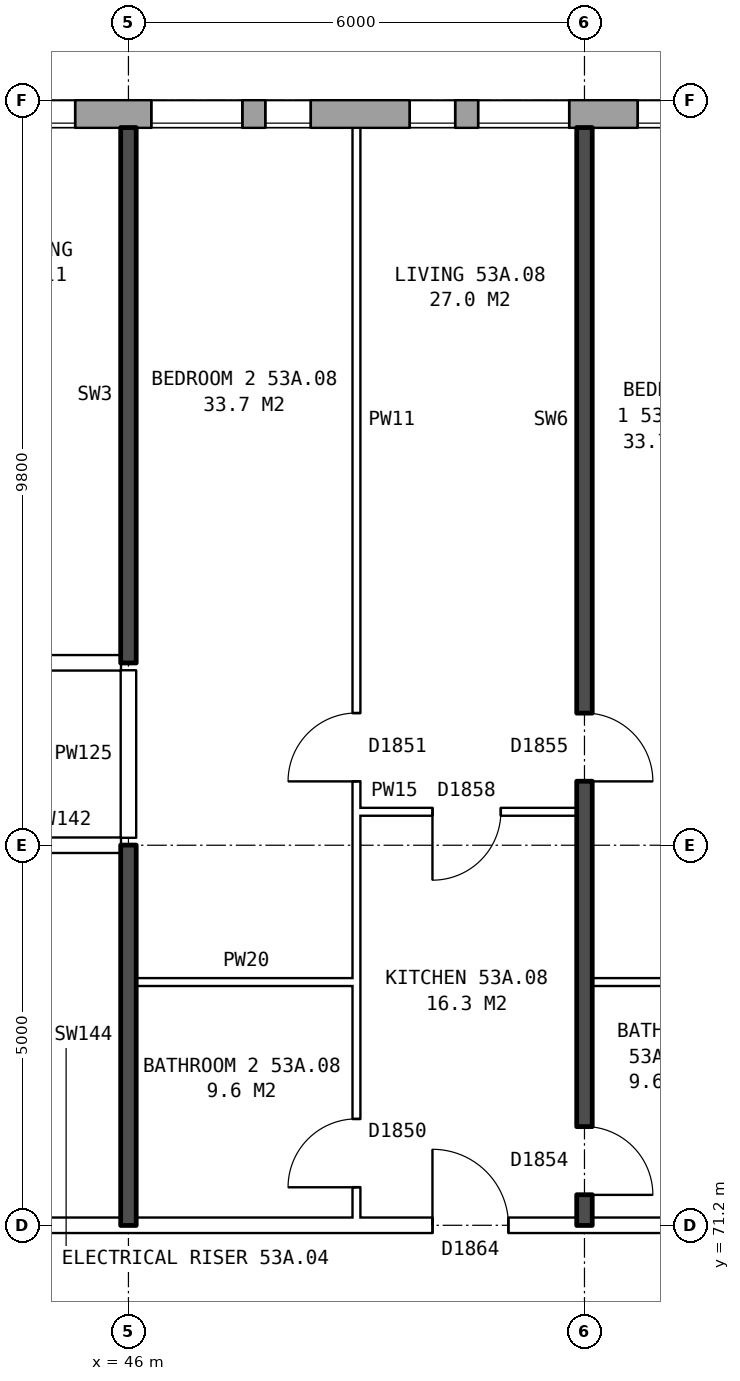
"""IFC4 building model, lengths in metres.
Left out: names, types, materials, properties, quantities, classifications, styles, units other than length and angle.
Written with IfcOpenShell. Run it as: python <this file> out.ifc"""

import sys

from ifc_helpers import new_model, si_unit, direction, frame, frame_2d, origin, place, context, subcontext, project, spatial, rectangle, extrude, element, fill, save


model = new_model("IFC4")
c1 = context("Model", 3, precision=1e-05, world=origin(), true_north=direction((0.0, 1.0)))
c2 = subcontext(c1, "Body", "Model", "MODEL_VIEW")
j1 = project(units=[si_unit("LENGTHUNIT", "METRE"), si_unit("PLANEANGLEUNIT", "RADIAN")], contexts=[c1])
p1 = place(None, origin())
s1 = spatial("IfcSite", under=j1, at=p1, CompositionType="ELEMENT")
p2 = place(p1, origin())
s2 = spatial("IfcBuilding", under=s1, at=p2, CompositionType="ELEMENT")
p3 = place(p2, frame((0.0, 0.0, 188.2)))
s3 = spatial("IfcBuildingStorey", under=s2, at=p3, CompositionType="ELEMENT", Elevation=188.2)
p4 = place(p3, frame((72.925, 85.82, 0.0), z_axis=(0.0, 0.0, 1.0), x_axis=(-1.0, 0.0, 0.0)))
e1 = element("IfcWall", 1, at=p4, inside=s3, PredefinedType="STANDARD", context=c2, shape_type="SweptSolid", body=[
    extrude(rectangle(XDim=39.601, YDim=0.36, at=frame_2d((19.8, 0.0))), origin(), (0.0, 0.0, 1.0), 2.85),
])
p5 = place(p4, frame((0.625, 0.0, 0.8)))
e2 = element("IfcOpeningElement", 2, at=p5, cuts=e1, PredefinedType="OPENING", context=c2, shape_type="SweptSolid", body=[
    extrude(rectangle(XDim=1.6, YDim=1.8, at=frame_2d((0.8, 0.9))), frame((0.0, 0.19, 0.0), z_axis=(0.0, -1.0, 0.0), x_axis=(1.0, 0.0, 0.0)), (0.0, 0.0, 1.0), 0.38),
])
p6 = place(p4, frame((3.625, 0.0, 0.8)))
e3 = element("IfcOpeningElement", 3, at=p6, cuts=e1, PredefinedType="OPENING", context=c2, shape_type="SweptSolid", body=[
    extrude(rectangle(XDim=1.6, YDim=1.8, at=frame_2d((0.8, 0.9))), frame((0.0, 0.19, 0.0), z_axis=(0.0, -1.0, 0.0), x_axis=(1.0, 0.0, 0.0)), (0.0, 0.0, 1.0), 0.38),
])
p7 = place(p4, frame((6.625, 0.0, 0.8)))
e4 = element("IfcOpeningElement", 4, at=p7, cuts=e1, PredefinedType="OPENING", context=c2, shape_type="SweptSolid", body=[
    extrude(rectangle(XDim=1.6, YDim=1.8, at=frame_2d((0.8, 0.9))), frame((0.0, 0.19, 0.0), z_axis=(0.0, -1.0, 0.0), x_axis=(1.0, 0.0, 0.0)), (0.0, 0.0, 1.0), 0.38),
])
p8 = place(p4, frame((9.625, 0.0, 0.8)))
e5 = element("IfcOpeningElement", 5, at=p8, cuts=e1, PredefinedType="OPENING", context=c2, shape_type="SweptSolid", body=[
    extrude(rectangle(XDim=1.6, YDim=1.8, at=frame_2d((0.8, 0.9))), frame((0.0, 0.19, 0.0), z_axis=(0.0, -1.0, 0.0), x_axis=(1.0, 0.0, 0.0)), (0.0, 0.0, 1.0), 0.38),
])
p9 = place(p4, frame((12.625, 0.0, 0.8)))
e6 = element("IfcOpeningElement", 6, at=p9, cuts=e1, PredefinedType="OPENING", context=c2, shape_type="SweptSolid", body=[
    extrude(rectangle(XDim=1.6, YDim=1.8, at=frame_2d((0.8, 0.9))), frame((0.0, 0.19, 0.0), z_axis=(0.0, -1.0, 0.0), x_axis=(1.0, 0.0, 0.0)), (0.0, 0.0, 1.0), 0.38),
])
p10 = place(p4, frame((15.575, 0.0, 0.15)))
e7 = element("IfcOpeningElement", 7, at=p10, cuts=e1, PredefinedType="OPENING", context=c2, shape_type="SweptSolid", body=[
    extrude(rectangle(XDim=0.6, YDim=0.9, at=frame_2d((0.3, 0.45))), frame((0.0, 0.19, 0.0), z_axis=(0.0, -1.0, 0.0), x_axis=(1.0, 0.0, 0.0)), (0.0, 0.0, 1.0), 0.38),
])
p11 = place(p4, frame((18.625, 0.0, 0.8)))
e8 = element("IfcOpeningElement", 8, at=p11, cuts=e1, PredefinedType="OPENING", context=c2, shape_type="SweptSolid", body=[
    extrude(rectangle(XDim=1.6, YDim=1.8, at=frame_2d((0.8, 0.9))), frame((0.0, 0.19, 0.0), z_axis=(0.0, -1.0, 0.0), x_axis=(1.0, 0.0, 0.0)), (0.0, 0.0, 1.0), 0.38),
])
p12 = place(p4, frame((21.125, 0.0, 0.8)))
e9 = element("IfcOpeningElement", 9, at=p12, cuts=e1, PredefinedType="OPENING", context=c2, shape_type="SweptSolid", body=[
    extrude(rectangle(XDim=1.2, YDim=1.8, at=frame_2d((0.6, 0.9))), frame((0.0, 0.19, 0.0), z_axis=(0.0, -1.0, 0.0), x_axis=(1.0, 0.0, 0.0)), (0.0, 0.0, 1.0), 0.38),
])
p13 = place(p4, frame((24.525, 0.0, 1.7)))
e10 = element("IfcOpeningElement", 10, at=p13, cuts=e1, PredefinedType="OPENING", context=c2, shape_type="SweptSolid", body=[
    extrude(rectangle(XDim=0.6, YDim=0.9, at=frame_2d((0.3, 0.45))), frame((0.0, 0.19, 0.0), z_axis=(0.0, -1.0, 0.0), x_axis=(1.0, 0.0, 0.0)), (0.0, 0.0, 1.0), 0.38),
])
p14 = place(p4, frame((27.625, 0.0, 0.8)))
e11 = element("IfcOpeningElement", 11, at=p14, cuts=e1, PredefinedType="OPENING", context=c2, shape_type="SweptSolid", body=[
    extrude(rectangle(XDim=1.6, YDim=1.8, at=frame_2d((0.8, 0.9))), frame((0.0, 0.19, 0.0), z_axis=(0.0, -1.0, 0.0), x_axis=(1.0, 0.0, 0.0)), (0.0, 0.0, 1.0), 0.38),
])
p15 = place(p4, frame((30.625, 0.0, 0.8)))
e12 = element("IfcOpeningElement", 12, at=p15, cuts=e1, PredefinedType="OPENING", context=c2, shape_type="SweptSolid", body=[
    extrude(rectangle(XDim=1.6, YDim=1.8, at=frame_2d((0.8, 0.9))), frame((0.0, 0.19, 0.0), z_axis=(0.0, -1.0, 0.0), x_axis=(1.0, 0.0, 0.0)), (0.0, 0.0, 1.0), 0.38),
])
p16 = place(p4, frame((33.625, 0.0, 0.8)))
e13 = element("IfcOpeningElement", 13, at=p16, cuts=e1, PredefinedType="OPENING", context=c2, shape_type="SweptSolid", body=[
    extrude(rectangle(XDim=1.6, YDim=1.8, at=frame_2d((0.8, 0.9))), frame((0.0, 0.19, 0.0), z_axis=(0.0, -1.0, 0.0), x_axis=(1.0, 0.0, 0.0)), (0.0, 0.0, 1.0), 0.38),
])
p17 = place(p4, frame((36.625, 0.0, 0.8)))
e14 = element("IfcOpeningElement", 14, at=p17, cuts=e1, PredefinedType="OPENING", context=c2, shape_type="SweptSolid", body=[
    extrude(rectangle(XDim=1.6, YDim=1.8, at=frame_2d((0.8, 0.9))), frame((0.0, 0.19, 0.0), z_axis=(0.0, -1.0, 0.0), x_axis=(1.0, 0.0, 0.0)), (0.0, 0.0, 1.0), 0.38),
])
p18 = place(p4, frame((16.475, 0.0, 0.15)))
e15 = element("IfcOpeningElement", 15, at=p18, cuts=e1, PredefinedType="OPENING", context=c2, shape_type="SweptSolid", body=[
    extrude(rectangle(XDim=1.2, YDim=1.8, at=frame_2d((0.6, 0.9))), frame((0.0, 0.19, 0.0), z_axis=(0.0, -1.0, 0.0), x_axis=(1.0, 0.0, 0.0)), (0.0, 0.0, 1.0), 0.38),
])
p19 = place(p4, frame((22.625, 0.0, 0.8)))
e16 = element("IfcOpeningElement", 16, at=p19, cuts=e1, PredefinedType="OPENING", context=c2, shape_type="SweptSolid", body=[
    extrude(rectangle(XDim=0.6, YDim=0.9, at=frame_2d((0.3, 0.45))), frame((0.0, 0.19, 0.0), z_axis=(0.0, -1.0, 0.0), x_axis=(1.0, 0.0, 0.0)), (0.0, 0.0, 1.0), 0.38),
])
p20 = place(p4, frame((25.425, 0.0, 0.8)))
e17 = element("IfcOpeningElement", 17, at=p20, cuts=e1, PredefinedType="OPENING", context=c2, shape_type="SweptSolid", body=[
    extrude(rectangle(XDim=1.2, YDim=1.8, at=frame_2d((0.6, 0.9))), frame((0.0, 0.19, 0.0), z_axis=(0.0, -1.0, 0.0), x_axis=(1.0, 0.0, 0.0)), (0.0, 0.0, 1.0), 0.38),
])
p21 = place(p3, frame((44.36, 71.2, 0.0), z_axis=(0.0, 0.0, 1.0), x_axis=(1.0, 0.0, 0.0)))
e18 = element("IfcWall", 18, at=p21, inside=s3, PredefinedType="PARTITIONING", context=c2, shape_type="SweptSolid", body=[
    extrude(rectangle(XDim=19.28, YDim=0.2, at=frame_2d((9.64, 0.0))), origin(), (0.0, 0.0, 1.0), 2.85),
])
p22 = place(p21, frame((14.64, 0.0, 0.0)))
e19 = element("IfcOpeningElement", 19, at=p22, cuts=e18, PredefinedType="OPENING", context=c2, shape_type="SweptSolid", body=[
    extrude(rectangle(XDim=1.0, YDim=2.1, at=frame_2d((0.5, 1.05))), frame((0.0, 0.11, 0.0), z_axis=(0.0, -1.0, 0.0), x_axis=(1.0, 0.0, 0.0)), (0.0, 0.0, 1.0), 0.22),
])
p23 = place(p21, frame((5.64, 0.0, 0.0)))
e20 = element("IfcOpeningElement", 20, at=p23, cuts=e18, PredefinedType="OPENING", context=c2, shape_type="SweptSolid", body=[
    extrude(rectangle(XDim=1.0, YDim=2.1, at=frame_2d((0.5, 1.05))), frame((0.0, 0.11, 0.0), z_axis=(0.0, -1.0, 0.0), x_axis=(1.0, 0.0, 0.0)), (0.0, 0.0, 1.0), 0.22),
])
p24 = place(p3, frame((46.1, 74.4, 0.0), z_axis=(0.0, 0.0, 1.0), x_axis=(1.0, 0.0, 0.0)))
e21 = element("IfcWall", 21, at=p24, inside=s3, PredefinedType="PARTITIONING", context=c2, shape_type="SweptSolid", body=[
    extrude(rectangle(XDim=2.9, YDim=0.1, at=frame_2d((1.45, 0.0))), origin(), (0.0, 0.0, 1.0), 2.85),
])
p25 = place(p3, frame((52.1, 74.4, 0.0), z_axis=(0.0, 0.0, 1.0), x_axis=(1.0, 0.0, 0.0)))
e22 = element("IfcWall", 22, at=p25, inside=s3, PredefinedType="PARTITIONING", context=c2, shape_type="SweptSolid", body=[
    extrude(rectangle(XDim=5.8, YDim=0.1, at=frame_2d((2.9, 0.0))), origin(), (0.0, 0.0, 1.0), 2.85),
])
p26 = place(p3, frame((44.36, 76.2, 0.0), z_axis=(0.0, 0.0, 1.0), x_axis=(1.0, 0.0, 0.0)))
e23 = element("IfcWall", 23, at=p26, inside=s3, PredefinedType="PARTITIONING", context=c2, shape_type="SweptSolid", body=[
    extrude(rectangle(XDim=1.54, YDim=0.2, at=frame_2d((0.77, 0.0))), origin(), (0.0, 0.0, 1.0), 2.85),
])
p27 = place(p3, frame((49.0, 76.64, 0.0), z_axis=(0.0, 0.0, 1.0), x_axis=(1.0, 0.0, 0.0)))
e24 = element("IfcWall", 24, at=p27, inside=s3, PredefinedType="PARTITIONING", context=c2, shape_type="SweptSolid", body=[
    extrude(rectangle(XDim=2.9, YDim=0.1, at=frame_2d((1.45, 0.0))), origin(), (0.0, 0.0, 1.0), 2.85),
])
p28 = place(p27, frame((1.0, 0.0, 0.0)))
e25 = element("IfcOpeningElement", 25, at=p28, cuts=e24, PredefinedType="OPENING", context=c2, shape_type="SweptSolid", body=[
    extrude(rectangle(XDim=0.9, YDim=2.1, at=frame_2d((0.45, 1.05))), frame((0.0, 0.06, 0.0), z_axis=(0.0, -1.0, 0.0), x_axis=(1.0, 0.0, 0.0)), (0.0, 0.0, 1.0), 0.12),
])
p29 = place(p3, frame((30.61, 78.6, 0.0), z_axis=(0.0, 0.0, 1.0), x_axis=(1.0, 0.0, 0.0)))
e26 = element("IfcWall", 26, at=p29, inside=s3, PredefinedType="PARTITIONING", context=c2, shape_type="SweptSolid", body=[
    extrude(rectangle(XDim=15.29, YDim=0.2, at=frame_2d((7.645, 0.0))), origin(), (0.0, 0.0, 1.0), 2.85),
])
p30 = place(p29, frame((12.84, 0.0, 0.0)))
e27 = element("IfcOpeningElement", 27, at=p30, cuts=e26, PredefinedType="OPENING", context=c2, shape_type="SweptSolid", body=[
    extrude(rectangle(XDim=1.0, YDim=2.1, at=frame_2d((0.5, 1.05))), frame((0.0, 0.11, 0.0), z_axis=(0.0, -1.0, 0.0), x_axis=(1.0, 0.0, 0.0)), (0.0, 0.0, 1.0), 0.22),
])
p31 = place(p29, frame((5.89, 0.0, 0.0)))
e28 = element("IfcOpeningElement", 28, at=p31, cuts=e26, PredefinedType="OPENING", context=c2, shape_type="SweptSolid", body=[
    extrude(rectangle(XDim=1.0, YDim=2.1, at=frame_2d((0.5, 1.05))), frame((0.0, 0.11, 0.0), z_axis=(0.0, -1.0, 0.0), x_axis=(1.0, 0.0, 0.0)), (0.0, 0.0, 1.0), 0.22),
])
p32 = place(p3, frame((46.0, 71.2, 0.0), z_axis=(0.0, 0.0, 1.0), x_axis=(0.0, 1.0, 0.0)))
e29 = element("IfcWall", 29, at=p32, inside=s3, PredefinedType="SOLIDWALL", context=c2, shape_type="SweptSolid", body=[
    extrude(rectangle(XDim=5.0, YDim=0.2, at=frame_2d((2.5, 0.0))), origin(), (0.0, 0.0, 1.0), 2.85),
])
p33 = place(p3, frame((46.0, 76.3, 0.0), z_axis=(0.0, 0.0, 1.0), x_axis=(0.0, 1.0, 0.0)))
e30 = element("IfcWall", 30, at=p33, inside=s3, PredefinedType="PARTITIONING", context=c2, shape_type="SweptSolid", body=[
    extrude(rectangle(XDim=2.2, YDim=0.2, at=frame_2d((1.1, 0.0))), origin(), (0.0, 0.0, 1.0), 2.85),
])
p34 = place(p3, frame((46.0, 78.6, 0.0), z_axis=(0.0, 0.0, 1.0), x_axis=(0.0, 1.0, 0.0)))
e31 = element("IfcWall", 31, at=p34, inside=s3, PredefinedType="SOLIDWALL", context=c2, shape_type="SweptSolid", body=[
    extrude(rectangle(XDim=7.04, YDim=0.2, at=frame_2d((3.52, 0.0))), origin(), (0.0, 0.0, 1.0), 2.85),
])
p35 = place(p3, frame((49.0, 71.3, 0.0), z_axis=(0.0, 0.0, 1.0), x_axis=(0.0, 1.0, 0.0)))
e32 = element("IfcWall", 32, at=p35, inside=s3, PredefinedType="PARTITIONING", context=c2, shape_type="SweptSolid", body=[
    extrude(rectangle(XDim=14.34, YDim=0.1, at=frame_2d((7.17, 0.0))), origin(), (0.0, 0.0, 1.0), 2.85),
])
p36 = place(p35, frame((5.74, 0.0, 0.0)))
e33 = element("IfcOpeningElement", 33, at=p36, cuts=e32, PredefinedType="OPENING", context=c2, shape_type="SweptSolid", body=[
    extrude(rectangle(XDim=0.9, YDim=2.1, at=frame_2d((0.45, 1.05))), frame((0.0, 0.06, 0.0), z_axis=(0.0, -1.0, 0.0), x_axis=(1.0, 0.0, 0.0)), (0.0, 0.0, 1.0), 0.12),
])
p37 = place(p35, frame((0.4, 0.0, 0.0)))
e34 = element("IfcOpeningElement", 34, at=p37, cuts=e32, PredefinedType="OPENING", context=c2, shape_type="SweptSolid", body=[
    extrude(rectangle(XDim=0.9, YDim=2.1, at=frame_2d((0.45, 1.05))), frame((0.0, 0.06, 0.0), z_axis=(0.0, -1.0, 0.0), x_axis=(1.0, 0.0, 0.0)), (0.0, 0.0, 1.0), 0.12),
])
p38 = place(p3, frame((52.0, 71.2, 0.0), z_axis=(0.0, 0.0, 1.0), x_axis=(0.0, 1.0, 0.0)))
e35 = element("IfcWall", 35, at=p38, inside=s3, PredefinedType="SOLIDWALL", context=c2, shape_type="SweptSolid", body=[
    extrude(rectangle(XDim=14.44, YDim=0.2, at=frame_2d((7.22, 0.0))), origin(), (0.0, 0.0, 1.0), 2.85),
])
p39 = place(p38, frame((5.84, 0.0, 0.0)))
e36 = element("IfcOpeningElement", 36, at=p39, cuts=e35, PredefinedType="OPENING", context=c2, shape_type="SweptSolid", body=[
    extrude(rectangle(XDim=0.9, YDim=2.1, at=frame_2d((0.45, 1.05))), frame((0.0, 0.11, 0.0), z_axis=(0.0, -1.0, 0.0), x_axis=(1.0, 0.0, 0.0)), (0.0, 0.0, 1.0), 0.22),
])
p40 = place(p38, frame((0.4, 0.0, 0.0)))
e37 = element("IfcOpeningElement", 37, at=p40, cuts=e35, PredefinedType="OPENING", context=c2, shape_type="SweptSolid", body=[
    extrude(rectangle(XDim=0.9, YDim=2.1, at=frame_2d((0.45, 1.05))), frame((0.0, 0.11, 0.0), z_axis=(0.0, -1.0, 0.0), x_axis=(1.0, 0.0, 0.0)), (0.0, 0.0, 1.0), 0.22),
])
p41 = place(p11, origin())
e38 = element("IfcWindow", 38, at=p41, inside=s3, PartitioningType="SINGLE_PANEL", PredefinedType="WINDOW", context=c2, shape_type="SweptSolid", body=[
    extrude(rectangle(XDim=1.6, YDim=1.8, at=frame_2d((0.8, 0.9))), frame((0.0, 0.15, 0.0), z_axis=(0.0, -1.0, 0.0), x_axis=(1.0, 0.0, 0.0)), (0.0, 0.0, 1.0), 0.06),
])
fill(e8, e38)
p42 = place(p12, origin())
e39 = element("IfcWindow", 39, at=p42, inside=s3, PartitioningType="SINGLE_PANEL", PredefinedType="WINDOW", context=c2, shape_type="SweptSolid", body=[
    extrude(rectangle(XDim=1.2, YDim=1.8, at=frame_2d((0.6, 0.9))), frame((0.0, 0.15, 0.0), z_axis=(0.0, -1.0, 0.0), x_axis=(1.0, 0.0, 0.0)), (0.0, 0.0, 1.0), 0.06),
])
fill(e9, e39)
p43 = place(p13, origin())
e40 = element("IfcWindow", 40, at=p43, inside=s3, PartitioningType="SINGLE_PANEL", PredefinedType="WINDOW", context=c2, shape_type="SweptSolid", body=[
    extrude(rectangle(XDim=0.6, YDim=0.9, at=frame_2d((0.3, 0.45))), frame((0.0, 0.15, 0.0), z_axis=(0.0, -1.0, 0.0), x_axis=(1.0, 0.0, 0.0)), (0.0, 0.0, 1.0), 0.06),
])
fill(e10, e40)
p44 = place(p14, origin())
e41 = element("IfcWindow", 41, at=p44, inside=s3, PartitioningType="SINGLE_PANEL", PredefinedType="WINDOW", context=c2, shape_type="SweptSolid", body=[
    extrude(rectangle(XDim=1.6, YDim=1.8, at=frame_2d((0.8, 0.9))), frame((0.0, 0.15, 0.0), z_axis=(0.0, -1.0, 0.0), x_axis=(1.0, 0.0, 0.0)), (0.0, 0.0, 1.0), 0.06),
])
fill(e11, e41)
p45 = place(p39, frame((0.9, 0.0, 0.0), z_axis=(0.0, 0.0, 1.0), x_axis=(-1.0, 0.0, 0.0)))
e42 = element("IfcDoor", 42, at=p45, inside=s3, OperationType="SINGLE_SWING_RIGHT", PredefinedType="DOOR", context=c2, shape_type="SweptSolid", body=[
    extrude(rectangle(XDim=0.9, YDim=2.1, at=frame_2d((0.45, 1.05))), frame((0.0, 0.025, 0.0), z_axis=(0.0, -1.0, 0.0), x_axis=(1.0, 0.0, 0.0)), (0.0, 0.0, 1.0), 0.05),
])
fill(e36, e42)
p46 = place(p36, origin())
e43 = element("IfcDoor", 43, at=p46, inside=s3, OperationType="SINGLE_SWING_LEFT", PredefinedType="DOOR", context=c2, shape_type="SweptSolid", body=[
    extrude(rectangle(XDim=0.9, YDim=2.1, at=frame_2d((0.45, 1.05))), frame((0.0, 0.025, 0.0), z_axis=(0.0, -1.0, 0.0), x_axis=(1.0, 0.0, 0.0)), (0.0, 0.0, 1.0), 0.05),
])
fill(e33, e43)
p47 = place(p23, origin())
e44 = element("IfcDoor", 44, at=p47, inside=s3, OperationType="SINGLE_SWING_LEFT", PredefinedType="DOOR", context=c2, shape_type="SweptSolid", body=[
    extrude(rectangle(XDim=1.0, YDim=2.1, at=frame_2d((0.5, 1.05))), frame((0.0, 0.025, 0.0), z_axis=(0.0, -1.0, 0.0), x_axis=(1.0, 0.0, 0.0)), (0.0, 0.0, 1.0), 0.05),
])
fill(e20, e44)
p48 = place(p28, frame((0.9, 0.0, 0.0), z_axis=(0.0, 0.0, 1.0), x_axis=(-1.0, 0.0, 0.0)))
e45 = element("IfcDoor", 45, at=p48, inside=s3, OperationType="SINGLE_SWING_RIGHT", PredefinedType="DOOR", context=c2, shape_type="SweptSolid", body=[
    extrude(rectangle(XDim=0.9, YDim=2.1, at=frame_2d((0.45, 1.05))), frame((0.0, 0.025, 0.0), z_axis=(0.0, -1.0, 0.0), x_axis=(1.0, 0.0, 0.0)), (0.0, 0.0, 1.0), 0.05),
])
fill(e25, e45)
p49 = place(p40, frame((0.9, 0.0, 0.0), z_axis=(0.0, 0.0, 1.0), x_axis=(-1.0, 0.0, 0.0)))
e46 = element("IfcDoor", 46, at=p49, inside=s3, OperationType="SINGLE_SWING_RIGHT", PredefinedType="DOOR", context=c2, shape_type="SweptSolid", body=[
    extrude(rectangle(XDim=0.9, YDim=2.1, at=frame_2d((0.45, 1.05))), frame((0.0, 0.025, 0.0), z_axis=(0.0, -1.0, 0.0), x_axis=(1.0, 0.0, 0.0)), (0.0, 0.0, 1.0), 0.05),
])
fill(e37, e46)
p50 = place(p37, origin())
e47 = element("IfcDoor", 47, at=p50, inside=s3, OperationType="SINGLE_SWING_LEFT", PredefinedType="DOOR", context=c2, shape_type="SweptSolid", body=[
    extrude(rectangle(XDim=0.9, YDim=2.1, at=frame_2d((0.45, 1.05))), frame((0.0, 0.025, 0.0), z_axis=(0.0, -1.0, 0.0), x_axis=(1.0, 0.0, 0.0)), (0.0, 0.0, 1.0), 0.05),
])
fill(e34, e47)
p51 = place(p19, origin())
e48 = element("IfcWindow", 48, at=p51, inside=s3, PartitioningType="SINGLE_PANEL", PredefinedType="WINDOW", context=c2, shape_type="SweptSolid", body=[
    extrude(rectangle(XDim=0.6, YDim=0.9, at=frame_2d((0.3, 0.45))), frame((0.0, 0.15, 0.0), z_axis=(0.0, -1.0, 0.0), x_axis=(1.0, 0.0, 0.0)), (0.0, 0.0, 1.0), 0.06),
])
fill(e16, e48)
p52 = place(p20, origin())
e49 = element("IfcWindow", 49, at=p52, inside=s3, PartitioningType="SINGLE_PANEL", PredefinedType="WINDOW", context=c2, shape_type="SweptSolid", body=[
    extrude(rectangle(XDim=1.2, YDim=1.8, at=frame_2d((0.6, 0.9))), frame((0.0, 0.15, 0.0), z_axis=(0.0, -1.0, 0.0), x_axis=(1.0, 0.0, 0.0)), (0.0, 0.0, 1.0), 0.06),
])
fill(e17, e49)
save(model, sys.argv[1])
